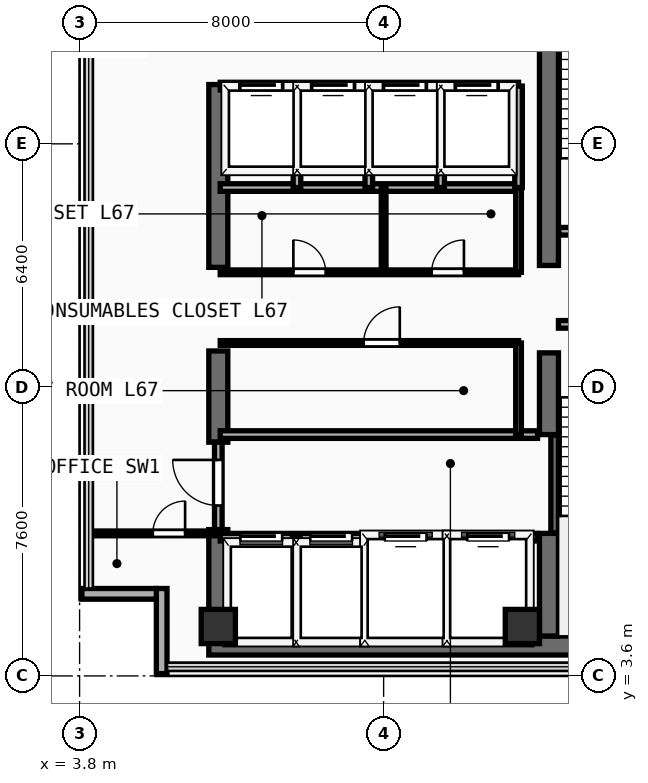
"""IFC4 building model, lengths in metres.
Left out: names, types, materials, properties, quantities, classifications, styles, units other than length and angle.
Written with IfcOpenShell. Run it as: python <this file> out.ifc"""

import sys

from ifc_helpers import new_model, si_unit, direction, frame, frame_2d, origin, origin_2d, place, context, subcontext, project, spatial, rectangle, extrude, element, fill, save


model = new_model("IFC4")
c1 = context("Model", 3, precision=1e-05, world=origin(), true_north=direction((0.0, 1.0)))
c2 = subcontext(c1, "Body", "Model", "MODEL_VIEW")
j1 = project(units=[si_unit("LENGTHUNIT", "METRE"), si_unit("PLANEANGLEUNIT", "RADIAN")], contexts=[c1])
p1 = place(None, origin())
s1 = spatial("IfcSite", under=j1, at=p1, CompositionType="ELEMENT")
p2 = place(p1, origin())
s2 = spatial("IfcBuilding", under=s1, at=p2, CompositionType="ELEMENT")
p3 = place(p2, frame((0.0, 0.0, 262.8)))
s3 = spatial("IfcBuildingStorey", under=s2, at=p3, CompositionType="ELEMENT", Elevation=262.8)
p4 = place(p3, frame((7.2, 4.4, 0.0), z_axis=(0.0, 0.0, 1.0), x_axis=(1.0, 0.0, 0.0)))
e1 = element("IfcWall", 1, at=p4, inside=s3, PredefinedType="SHEAR", context=c2, shape_type="SweptSolid", body=[
    extrude(rectangle(XDim=13.85, YDim=0.5, at=frame_2d((6.925, 0.0))), origin(), (0.0, 0.0, 1.0), 3.56),
])
p5 = place(p3, frame((7.45, 4.65, 0.0), z_axis=(0.0, 0.0, 1.0), x_axis=(0.0, 1.0, 0.0)))
e2 = element("IfcWall", 2, at=p5, inside=s3, PredefinedType="SHEAR", context=c2, shape_type="SweptSolid", body=[
    extrude(rectangle(XDim=2.8, YDim=0.5, at=frame_2d((1.4, 0.0))), origin(), (0.0, 0.0, 1.0), 3.56),
])
p6 = place(p3, frame((7.45, 9.75, 0.0), z_axis=(0.0, 0.0, 1.0), x_axis=(0.0, 1.0, 0.0)))
e3 = element("IfcWall", 3, at=p6, inside=s3, PredefinedType="SHEAR", context=c2, shape_type="SweptSolid", body=[
    extrude(rectangle(XDim=2.4, YDim=0.5, at=frame_2d((1.2, 0.0))), origin(), (0.0, 0.0, 1.0), 3.56),
])
p7 = place(p3, frame((7.45, 14.35, 0.0), z_axis=(0.0, 0.0, 1.0), x_axis=(0.0, 1.0, 0.0)))
e4 = element("IfcWall", 4, at=p7, inside=s3, PredefinedType="SHEAR", context=c2, shape_type="SweptSolid", body=[
    extrude(rectangle(XDim=4.81, YDim=0.5, at=frame_2d((2.405, 0.0))), origin(), (0.0, 0.0, 1.0), 3.56),
])
p8 = place(p3, frame((16.15, 4.65, 0.0), z_axis=(0.0, 0.0, 1.0), x_axis=(0.0, 1.0, 0.0)))
e5 = element("IfcWall", 5, at=p8, inside=s3, PredefinedType="SHEAR", context=c2, shape_type="SweptSolid", body=[
    extrude(rectangle(XDim=2.7, YDim=0.5, at=frame_2d((1.35, 0.0))), origin(), (0.0, 0.0, 1.0), 3.56),
])
p9 = place(p3, frame((16.15, 9.95, 0.0), z_axis=(0.0, 0.0, 1.0), x_axis=(0.0, 1.0, 0.0)))
e6 = element("IfcWall", 6, at=p9, inside=s3, PredefinedType="SHEAR", context=c2, shape_type="SweptSolid", body=[
    extrude(rectangle(XDim=2.15, YDim=0.5, at=frame_2d((1.075, 0.0))), origin(), (0.0, 0.0, 1.0), 3.56),
])
p10 = place(p3, frame((16.15, 14.4, 0.0), z_axis=(0.0, 0.0, 1.0), x_axis=(0.0, 1.0, 0.0)))
e7 = element("IfcWall", 7, at=p10, inside=s3, PredefinedType="SHEAR", context=c2, shape_type="SweptSolid", body=[
    extrude(rectangle(XDim=9.1, YDim=0.5, at=frame_2d((4.55, 0.0))), origin(), (0.0, 0.0, 1.0), 3.56),
])
for number, where, z_axis, x_axis in (
    (8, (7.45, 4.9, 0.0), (0.0, 0.0, 1.0), (1.0, 0.0, 0.0)),
    (9, (15.45, 4.9, 0.0), (0.0, 0.0, 1.0), (1.0, 0.0, 0.0)),
):
    element("IfcColumn", number, at=place(p3, frame(where, z_axis=z_axis, x_axis=x_axis)), inside=s3, PredefinedType="COLUMN", context=c2, shape_type="SweptSolid", body=[
        extrude(rectangle(XDim=0.9, YDim=0.9, at=origin_2d()), origin(), (0.0, 0.0, 1.0), 3.56),
    ])
p11 = place(p3, frame((5.96, 3.66, 0.0), z_axis=(0.0, 0.0, 1.0), x_axis=(0.0, 1.0, 0.0)))
e10 = element("IfcWall", 10, at=p11, inside=s3, PredefinedType="SOLIDWALL", context=c2, shape_type="SweptSolid", body=[
    extrude(rectangle(XDim=2.24, YDim=0.28, at=frame_2d((1.12, 0.0))), origin(), (0.0, 0.0, 1.0), 3.56),
])
p12 = place(p3, frame((3.86, 5.76, 0.0), z_axis=(0.0, 0.0, 1.0), x_axis=(1.0, 0.0, 0.0)))
e11 = element("IfcWall", 11, at=p12, inside=s3, PredefinedType="SOLIDWALL", context=c2, shape_type="SweptSolid", body=[
    extrude(rectangle(XDim=1.96, YDim=0.28, at=frame_2d((0.98, 0.0))), origin(), (0.0, 0.0, 1.0), 3.56),
])
p13 = place(p3, frame((16.3, 7.36, 0.0), z_axis=(0.0, 0.0, 1.0), x_axis=(0.0, 1.0, 0.0)))
e12 = element("IfcWall", 12, at=p13, inside=s3, PredefinedType="SHEAR", context=c2, shape_type="SweptSolid", body=[
    extrude(rectangle(XDim=2.58, YDim=0.2, at=frame_2d((1.29, 0.0))), origin(), (0.0, 0.0, 1.0), 3.56),
])
p14 = place(p3, frame((16.4, 12.85, 0.0), z_axis=(0.0, 0.0, 1.0), x_axis=(1.0, 0.0, 0.0)))
e13 = element("IfcWall", 13, at=p14, inside=s3, PredefinedType="PARTITIONING", context=c2, shape_type="SweptSolid", body=[
    extrude(rectangle(XDim=3.96, YDim=0.2, at=frame_2d((1.98, 0.0))), origin(), (0.0, 0.0, 1.0), 3.56),
])
p15 = place(p14, frame((1.304, 0.0, 0.0)))
e14 = element("IfcOpeningElement", 14, at=p15, cuts=e13, PredefinedType="OPENING", context=c2, shape_type="SweptSolid", body=[
    extrude(rectangle(XDim=1.1, YDim=2.2, at=frame_2d((0.55, 1.1))), frame((0.0, 0.11, 0.0), z_axis=(0.0, -1.0, 0.0), x_axis=(1.0, 0.0, 0.0)), (0.0, 0.0, 1.0), 0.22),
])
p16 = place(p3, frame((16.41, 15.3, 0.0), z_axis=(0.0, 0.0, 1.0), x_axis=(1.0, 0.0, 0.0)))
e15 = element("IfcWall", 15, at=p16, inside=s3, PredefinedType="PARTITIONING", context=c2, shape_type="SweptSolid", body=[
    extrude(rectangle(XDim=3.95, YDim=0.2, at=frame_2d((1.975, 0.0))), origin(), (0.0, 0.0, 1.0), 3.56),
])
p17 = place(p16, frame((1.294, 0.0, 0.0)))
e16 = element("IfcOpeningElement", 16, at=p17, cuts=e15, PredefinedType="OPENING", context=c2, shape_type="SweptSolid", body=[
    extrude(rectangle(XDim=1.1, YDim=2.2, at=frame_2d((0.55, 1.1))), frame((0.0, 0.11, 0.0), z_axis=(0.0, -1.0, 0.0), x_axis=(1.0, 0.0, 0.0)), (0.0, 0.0, 1.0), 0.22),
])
p18 = place(p3, frame((7.5, 7.25, 0.0), z_axis=(0.0, 0.0, 1.0), x_axis=(1.0, 0.0, 0.0)))
e17 = element("IfcWall", 17, at=p18, inside=s3, PredefinedType="PARTITIONING", context=c2, shape_type="SweptSolid", body=[
    extrude(rectangle(XDim=8.35, YDim=0.2, at=frame_2d((4.175, 0.0))), origin(), (0.0, 0.0, 1.0), 3.56),
])
p19 = place(p18, frame((0.53, 0.0, 0.0)))
e18 = element("IfcOpeningElement", 18, at=p19, cuts=e17, PredefinedType="OPENING", context=c2, shape_type="SweptSolid", body=[
    extrude(rectangle(XDim=1.1, YDim=2.2, at=frame_2d((0.55, 1.1))), frame((0.0, 0.11, 0.0), z_axis=(0.0, -1.0, 0.0), x_axis=(1.0, 0.0, 0.0)), (0.0, 0.0, 1.0), 0.22),
])
p20 = place(p18, frame((2.37, 0.0, 0.0)))
e19 = element("IfcOpeningElement", 19, at=p20, cuts=e17, PredefinedType="OPENING", context=c2, shape_type="SweptSolid", body=[
    extrude(rectangle(XDim=1.1, YDim=2.2, at=frame_2d((0.55, 1.1))), frame((0.0, 0.11, 0.0), z_axis=(0.0, -1.0, 0.0), x_axis=(1.0, 0.0, 0.0)), (0.0, 0.0, 1.0), 0.22),
])
p21 = place(p18, frame((4.33, 0.0, 0.0)))
e20 = element("IfcOpeningElement", 20, at=p21, cuts=e17, PredefinedType="OPENING", context=c2, shape_type="SweptSolid", body=[
    extrude(rectangle(XDim=1.1, YDim=2.2, at=frame_2d((0.55, 1.1))), frame((0.0, 0.11, 0.0), z_axis=(0.0, -1.0, 0.0), x_axis=(1.0, 0.0, 0.0)), (0.0, 0.0, 1.0), 0.22),
])
p22 = place(p18, frame((6.5, 0.0, 0.0)))
e21 = element("IfcOpeningElement", 21, at=p22, cuts=e17, PredefinedType="OPENING", context=c2, shape_type="SweptSolid", body=[
    extrude(rectangle(XDim=1.1, YDim=2.2, at=frame_2d((0.55, 1.1))), frame((0.0, 0.11, 0.0), z_axis=(0.0, -1.0, 0.0), x_axis=(1.0, 0.0, 0.0)), (0.0, 0.0, 1.0), 0.22),
])
p23 = place(p3, frame((7.5, 9.95, 0.0), z_axis=(0.0, 0.0, 1.0), x_axis=(1.0, 0.0, 0.0)))
e22 = element("IfcWall", 22, at=p23, inside=s3, PredefinedType="PARTITIONING", context=c2, shape_type="SweptSolid", body=[
    extrude(rectangle(XDim=8.35, YDim=0.2, at=frame_2d((4.175, 0.0))), origin(), (0.0, 0.0, 1.0), 3.56),
])
for number, where, z_axis, x_axis in (
    (23, (9.5, 4.45, 0.0), (0.0, 0.0, 1.0), (0.0, 1.0, 0.0)),
    (24, (11.36, 4.45, 0.0), (0.0, 0.0, 1.0), (0.0, 1.0, 0.0)),
    (25, (13.46, 4.45, 0.0), (0.0, 0.0, 1.0), (0.0, 1.0, 0.0)),
):
    element("IfcWall", number, at=place(p3, frame(where, z_axis=z_axis, x_axis=x_axis)), inside=s3, PredefinedType="PARTITIONING", context=c2, shape_type="SweptSolid", body=[
        extrude(rectangle(XDim=2.8, YDim=0.2, at=frame_2d((1.4, 0.0))), origin(), (0.0, 0.0, 1.0), 3.56),
    ])
p24 = place(p3, frame((7.45, 7.45, 0.0), z_axis=(0.0, 0.0, 1.0), x_axis=(0.0, 1.0, 0.0)))
e26 = element("IfcWall", 26, at=p24, inside=s3, PredefinedType="PARTITIONING", context=c2, shape_type="SweptSolid", body=[
    extrude(rectangle(XDim=2.3, YDim=0.2, at=frame_2d((1.15, 0.0))), origin(), (0.0, 0.0, 1.0), 2.54),
])
p25 = place(p24, frame((0.633, 0.0, 0.0)))
e27 = element("IfcOpeningElement", 27, at=p25, cuts=e26, PredefinedType="OPENING", context=c2, shape_type="SweptSolid", body=[
    extrude(rectangle(XDim=1.2, YDim=2.25, at=frame_2d((0.6, 1.125))), frame((0.0, 0.11, 0.0), z_axis=(0.0, -1.0, 0.0), x_axis=(1.0, 0.0, 0.0)), (0.0, 0.0, 1.0), 0.22),
])
p26 = place(p3, frame((7.5, 16.45, 0.0), z_axis=(0.0, 0.0, 1.0), x_axis=(1.0, 0.0, 0.0)))
e28 = element("IfcWall", 28, at=p26, inside=s3, PredefinedType="PARTITIONING", context=c2, shape_type="SweptSolid", body=[
    extrude(rectangle(XDim=7.85, YDim=0.2, at=frame_2d((3.925, 0.0))), origin(), (0.0, 0.0, 1.0), 3.56),
])
p27 = place(p3, frame((7.5, 12.36, 0.0), z_axis=(0.0, 0.0, 1.0), x_axis=(1.0, 0.0, 0.0)))
e29 = element("IfcWall", 29, at=p27, inside=s3, PredefinedType="PARTITIONING", context=c2, shape_type="SweptSolid", body=[
    extrude(rectangle(XDim=7.85, YDim=0.125, at=frame_2d((3.925, 0.0))), origin(), (0.0, 0.0, 1.0), 3.56),
])
p28 = place(p27, frame((3.775, 0.0, 0.0)))
e30 = element("IfcOpeningElement", 30, at=p28, cuts=e29, PredefinedType="OPENING", context=c2, shape_type="SweptSolid", body=[
    extrude(rectangle(XDim=0.95, YDim=2.15, at=frame_2d((0.475, 1.075))), frame((0.0, 0.073, 0.0), z_axis=(0.0, -1.0, 0.0), x_axis=(1.0, 0.0, 0.0)), (0.0, 0.0, 1.0), 0.145),
])
p29 = place(p3, frame((7.5, 14.22, 0.0), z_axis=(0.0, 0.0, 1.0), x_axis=(1.0, 0.0, 0.0)))
e31 = element("IfcWall", 31, at=p29, inside=s3, PredefinedType="PARTITIONING", context=c2, shape_type="SweptSolid", body=[
    extrude(rectangle(XDim=7.85, YDim=0.125, at=frame_2d((3.925, 0.0))), origin(), (0.0, 0.0, 1.0), 3.56),
])
p30 = place(p29, frame((1.925, 0.0, 0.0)))
e32 = element("IfcOpeningElement", 32, at=p30, cuts=e31, PredefinedType="OPENING", context=c2, shape_type="SweptSolid", body=[
    extrude(rectangle(XDim=0.85, YDim=2.15, at=frame_2d((0.425, 1.075))), frame((0.0, 0.073, 0.0), z_axis=(0.0, -1.0, 0.0), x_axis=(1.0, 0.0, 0.0)), (0.0, 0.0, 1.0), 0.145),
])
p31 = place(p29, frame((5.563, 0.0, 0.0)))
e33 = element("IfcOpeningElement", 33, at=p31, cuts=e31, PredefinedType="OPENING", context=c2, shape_type="SweptSolid", body=[
    extrude(rectangle(XDim=0.85, YDim=2.15, at=frame_2d((0.425, 1.075))), frame((0.0, 0.073, 0.0), z_axis=(0.0, -1.0, 0.0), x_axis=(1.0, 0.0, 0.0)), (0.0, 0.0, 1.0), 0.145),
])
p32 = place(p3, frame((15.35, 9.95, 0.0), z_axis=(0.0, 0.0, 1.0), x_axis=(0.0, 1.0, 0.0)))
e34 = element("IfcWall", 34, at=p32, inside=s3, PredefinedType="PARTITIONING", context=c2, shape_type="SweptSolid", body=[
    extrude(rectangle(XDim=2.41, YDim=0.15, at=frame_2d((1.205, 0.0))), origin(), (0.0, 0.0, 1.0), 3.56),
])
p33 = place(p3, frame((15.35, 14.22, 0.0), z_axis=(0.0, 0.0, 1.0), x_axis=(0.0, 1.0, 0.0)))
e35 = element("IfcWall", 35, at=p33, inside=s3, PredefinedType="PARTITIONING", context=c2, shape_type="SweptSolid", body=[
    extrude(rectangle(XDim=2.23, YDim=0.15, at=frame_2d((1.115, 0.0))), origin(), (0.0, 0.0, 1.0), 3.56),
])
p34 = place(p3, frame((11.8, 14.22, 0.0), z_axis=(0.0, 0.0, 1.0), x_axis=(0.0, 1.0, 0.0)))
e36 = element("IfcWall", 36, at=p34, inside=s3, PredefinedType="PARTITIONING", context=c2, shape_type="SweptSolid", body=[
    extrude(rectangle(XDim=2.23, YDim=0.125, at=frame_2d((1.115, 0.0))), origin(), (0.0, 0.0, 1.0), 3.56),
])
p35 = place(p3, frame((7.5, 19.12, 0.0), z_axis=(0.0, 0.0, 1.0), x_axis=(1.0, 0.0, 0.0)))
e37 = element("IfcWall", 37, at=p35, inside=s3, PredefinedType="PARTITIONING", context=c2, shape_type="SweptSolid", body=[
    extrude(rectangle(XDim=7.85, YDim=0.2, at=frame_2d((3.925, 0.0))), origin(), (0.0, 0.0, 1.0), 3.56),
])
p36 = place(p35, frame((0.53, 0.0, 0.0)))
e38 = element("IfcOpeningElement", 38, at=p36, cuts=e37, PredefinedType="OPENING", context=c2, shape_type="SweptSolid", body=[
    extrude(rectangle(XDim=1.1, YDim=2.2, at=frame_2d((0.55, 1.1))), frame((0.0, 0.11, 0.0), z_axis=(0.0, -1.0, 0.0), x_axis=(1.0, 0.0, 0.0)), (0.0, 0.0, 1.0), 0.22),
])
p37 = place(p35, frame((2.42, 0.0, 0.0)))
e39 = element("IfcOpeningElement", 39, at=p37, cuts=e37, PredefinedType="OPENING", context=c2, shape_type="SweptSolid", body=[
    extrude(rectangle(XDim=1.1, YDim=2.2, at=frame_2d((0.55, 1.1))), frame((0.0, 0.11, 0.0), z_axis=(0.0, -1.0, 0.0), x_axis=(1.0, 0.0, 0.0)), (0.0, 0.0, 1.0), 0.22),
])
p38 = place(p35, frame((4.31, 0.0, 0.0)))
e40 = element("IfcOpeningElement", 40, at=p38, cuts=e37, PredefinedType="OPENING", context=c2, shape_type="SweptSolid", body=[
    extrude(rectangle(XDim=1.1, YDim=2.2, at=frame_2d((0.55, 1.1))), frame((0.0, 0.11, 0.0), z_axis=(0.0, -1.0, 0.0), x_axis=(1.0, 0.0, 0.0)), (0.0, 0.0, 1.0), 0.22),
])
p39 = place(p35, frame((6.2, 0.0, 0.0)))
e41 = element("IfcOpeningElement", 41, at=p39, cuts=e37, PredefinedType="OPENING", context=c2, shape_type="SweptSolid", body=[
    extrude(rectangle(XDim=1.1, YDim=2.2, at=frame_2d((0.55, 1.1))), frame((0.0, 0.11, 0.0), z_axis=(0.0, -1.0, 0.0), x_axis=(1.0, 0.0, 0.0)), (0.0, 0.0, 1.0), 0.22),
])
for number, where, z_axis, x_axis in (
    (42, (15.35, 16.45, 0.0), (0.0, 0.0, 1.0), (0.0, 1.0, 0.0)),
    (43, (9.52, 16.45, 0.0), (0.0, 0.0, 1.0), (0.0, 1.0, 0.0)),
    (44, (11.41, 16.45, 0.0), (0.0, 0.0, 1.0), (0.0, 1.0, 0.0)),
    (45, (13.3, 16.45, 0.0), (0.0, 0.0, 1.0), (0.0, 1.0, 0.0)),
):
    element("IfcWall", number, at=place(p3, frame(where, z_axis=z_axis, x_axis=x_axis)), inside=s3, PredefinedType="PARTITIONING", context=c2, shape_type="SweptSolid", body=[
        extrude(rectangle(XDim=2.67, YDim=0.2, at=frame_2d((1.335, 0.0))), origin(), (0.0, 0.0, 1.0), 3.56),
    ])
p40 = place(p3, frame((4.04, 7.35, 0.0), z_axis=(0.0, 0.0, 1.0), x_axis=(1.0, 0.0, 0.0)))
e46 = element("IfcWall", 46, at=p40, inside=s3, PredefinedType="PARTITIONING", context=c2, shape_type="SweptSolid", body=[
    extrude(rectangle(XDim=3.36, YDim=0.125, at=frame_2d((1.68, 0.0))), origin(), (0.0, 0.0, 1.0), 3.56),
])
p41 = place(p40, frame((1.687, 0.0, 0.0)))
e47 = element("IfcOpeningElement", 47, at=p41, cuts=e46, PredefinedType="OPENING", context=c2, shape_type="SweptSolid", body=[
    extrude(rectangle(XDim=0.85, YDim=2.15, at=frame_2d((0.425, 1.075))), frame((0.0, 0.073, 0.0), z_axis=(0.0, -1.0, 0.0), x_axis=(1.0, 0.0, 0.0)), (0.0, 0.0, 1.0), 0.145),
])
p42 = place(p19, origin())
e48 = element("IfcDoor", 48, at=p42, inside=s3, OperationType="SLIDING_TO_LEFT", PredefinedType="DOOR", context=c2, shape_type="SweptSolid", body=[
    extrude(rectangle(XDim=1.1, YDim=2.2, at=frame_2d((0.55, 1.1))), frame((0.0, 0.025, 0.0), z_axis=(0.0, -1.0, 0.0), x_axis=(1.0, 0.0, 0.0)), (0.0, 0.0, 1.0), 0.05),
])
fill(e18, e48)
p43 = place(p20, origin())
e49 = element("IfcDoor", 49, at=p43, inside=s3, OperationType="SLIDING_TO_LEFT", PredefinedType="DOOR", context=c2, shape_type="SweptSolid", body=[
    extrude(rectangle(XDim=1.1, YDim=2.2, at=frame_2d((0.55, 1.1))), frame((0.0, 0.025, 0.0), z_axis=(0.0, -1.0, 0.0), x_axis=(1.0, 0.0, 0.0)), (0.0, 0.0, 1.0), 0.05),
])
fill(e19, e49)
p44 = place(p21, origin())
e50 = element("IfcDoor", 50, at=p44, inside=s3, OperationType="SLIDING_TO_LEFT", PredefinedType="DOOR", context=c2, shape_type="SweptSolid", body=[
    extrude(rectangle(XDim=1.1, YDim=2.2, at=frame_2d((0.55, 1.1))), frame((0.0, 0.025, 0.0), z_axis=(0.0, -1.0, 0.0), x_axis=(1.0, 0.0, 0.0)), (0.0, 0.0, 1.0), 0.05),
])
fill(e20, e50)
p45 = place(p22, origin())
e51 = element("IfcDoor", 51, at=p45, inside=s3, OperationType="SLIDING_TO_LEFT", PredefinedType="DOOR", context=c2, shape_type="SweptSolid", body=[
    extrude(rectangle(XDim=1.1, YDim=2.2, at=frame_2d((0.55, 1.1))), frame((0.0, 0.025, 0.0), z_axis=(0.0, -1.0, 0.0), x_axis=(1.0, 0.0, 0.0)), (0.0, 0.0, 1.0), 0.05),
])
fill(e21, e51)
p46 = place(p25, frame((1.2, 0.0, 0.0), z_axis=(0.0, 0.0, 1.0), x_axis=(-1.0, 0.0, 0.0)))
e52 = element("IfcDoor", 52, at=p46, inside=s3, OperationType="SINGLE_SWING_LEFT", PredefinedType="DOOR", context=c2, shape_type="SweptSolid", body=[
    extrude(rectangle(XDim=1.2, YDim=2.25, at=frame_2d((0.6, 1.125))), frame((0.0, 0.025, 0.0), z_axis=(0.0, -1.0, 0.0), x_axis=(1.0, 0.0, 0.0)), (0.0, 0.0, 1.0), 0.05),
])
fill(e27, e52)
p47 = place(p28, origin())
e53 = element("IfcDoor", 53, at=p47, inside=s3, OperationType="SINGLE_SWING_RIGHT", PredefinedType="DOOR", context=c2, shape_type="SweptSolid", body=[
    extrude(rectangle(XDim=0.95, YDim=2.15, at=frame_2d((0.475, 1.075))), frame((0.0, 0.025, 0.0), z_axis=(0.0, -1.0, 0.0), x_axis=(1.0, 0.0, 0.0)), (0.0, 0.0, 1.0), 0.05),
])
fill(e30, e53)
p48 = place(p30, origin())
e54 = element("IfcDoor", 54, at=p48, inside=s3, OperationType="SINGLE_SWING_LEFT", PredefinedType="DOOR", context=c2, shape_type="SweptSolid", body=[
    extrude(rectangle(XDim=0.85, YDim=2.15, at=frame_2d((0.425, 1.075))), frame((0.0, 0.025, 0.0), z_axis=(0.0, -1.0, 0.0), x_axis=(1.0, 0.0, 0.0)), (0.0, 0.0, 1.0), 0.05),
])
fill(e32, e54)
p49 = place(p31, origin())
e55 = element("IfcDoor", 55, at=p49, inside=s3, OperationType="SINGLE_SWING_RIGHT", PredefinedType="DOOR", context=c2, shape_type="SweptSolid", body=[
    extrude(rectangle(XDim=0.85, YDim=2.15, at=frame_2d((0.425, 1.075))), frame((0.0, 0.025, 0.0), z_axis=(0.0, -1.0, 0.0), x_axis=(1.0, 0.0, 0.0)), (0.0, 0.0, 1.0), 0.05),
])
fill(e33, e55)
p50 = place(p36, origin())
e56 = element("IfcDoor", 56, at=p50, inside=s3, OperationType="SLIDING_TO_LEFT", PredefinedType="DOOR", context=c2, shape_type="SweptSolid", body=[
    extrude(rectangle(XDim=1.1, YDim=2.2, at=frame_2d((0.55, 1.1))), frame((0.0, 0.025, 0.0), z_axis=(0.0, -1.0, 0.0), x_axis=(1.0, 0.0, 0.0)), (0.0, 0.0, 1.0), 0.05),
])
fill(e38, e56)
p51 = place(p37, origin())
e57 = element("IfcDoor", 57, at=p51, inside=s3, OperationType="SLIDING_TO_LEFT", PredefinedType="DOOR", context=c2, shape_type="SweptSolid", body=[
    extrude(rectangle(XDim=1.1, YDim=2.2, at=frame_2d((0.55, 1.1))), frame((0.0, 0.025, 0.0), z_axis=(0.0, -1.0, 0.0), x_axis=(1.0, 0.0, 0.0)), (0.0, 0.0, 1.0), 0.05),
])
fill(e39, e57)
p52 = place(p38, origin())
e58 = element("IfcDoor", 58, at=p52, inside=s3, OperationType="SLIDING_TO_LEFT", PredefinedType="DOOR", context=c2, shape_type="SweptSolid", body=[
    extrude(rectangle(XDim=1.1, YDim=2.2, at=frame_2d((0.55, 1.1))), frame((0.0, 0.025, 0.0), z_axis=(0.0, -1.0, 0.0), x_axis=(1.0, 0.0, 0.0)), (0.0, 0.0, 1.0), 0.05),
])
fill(e40, e58)
p53 = place(p39, origin())
e59 = element("IfcDoor", 59, at=p53, inside=s3, OperationType="SLIDING_TO_LEFT", PredefinedType="DOOR", context=c2, shape_type="SweptSolid", body=[
    extrude(rectangle(XDim=1.1, YDim=2.2, at=frame_2d((0.55, 1.1))), frame((0.0, 0.025, 0.0), z_axis=(0.0, -1.0, 0.0), x_axis=(1.0, 0.0, 0.0)), (0.0, 0.0, 1.0), 0.05),
])
fill(e41, e59)
p54 = place(p41, origin())
e60 = element("IfcDoor", 60, at=p54, inside=s3, OperationType="SINGLE_SWING_RIGHT", PredefinedType="DOOR", context=c2, shape_type="SweptSolid", body=[
    extrude(rectangle(XDim=0.85, YDim=2.15, at=frame_2d((0.425, 1.075))), frame((0.0, 0.025, 0.0), z_axis=(0.0, -1.0, 0.0), x_axis=(1.0, 0.0, 0.0)), (0.0, 0.0, 1.0), 0.05),
])
fill(e47, e60)
save(model, sys.argv[1])
